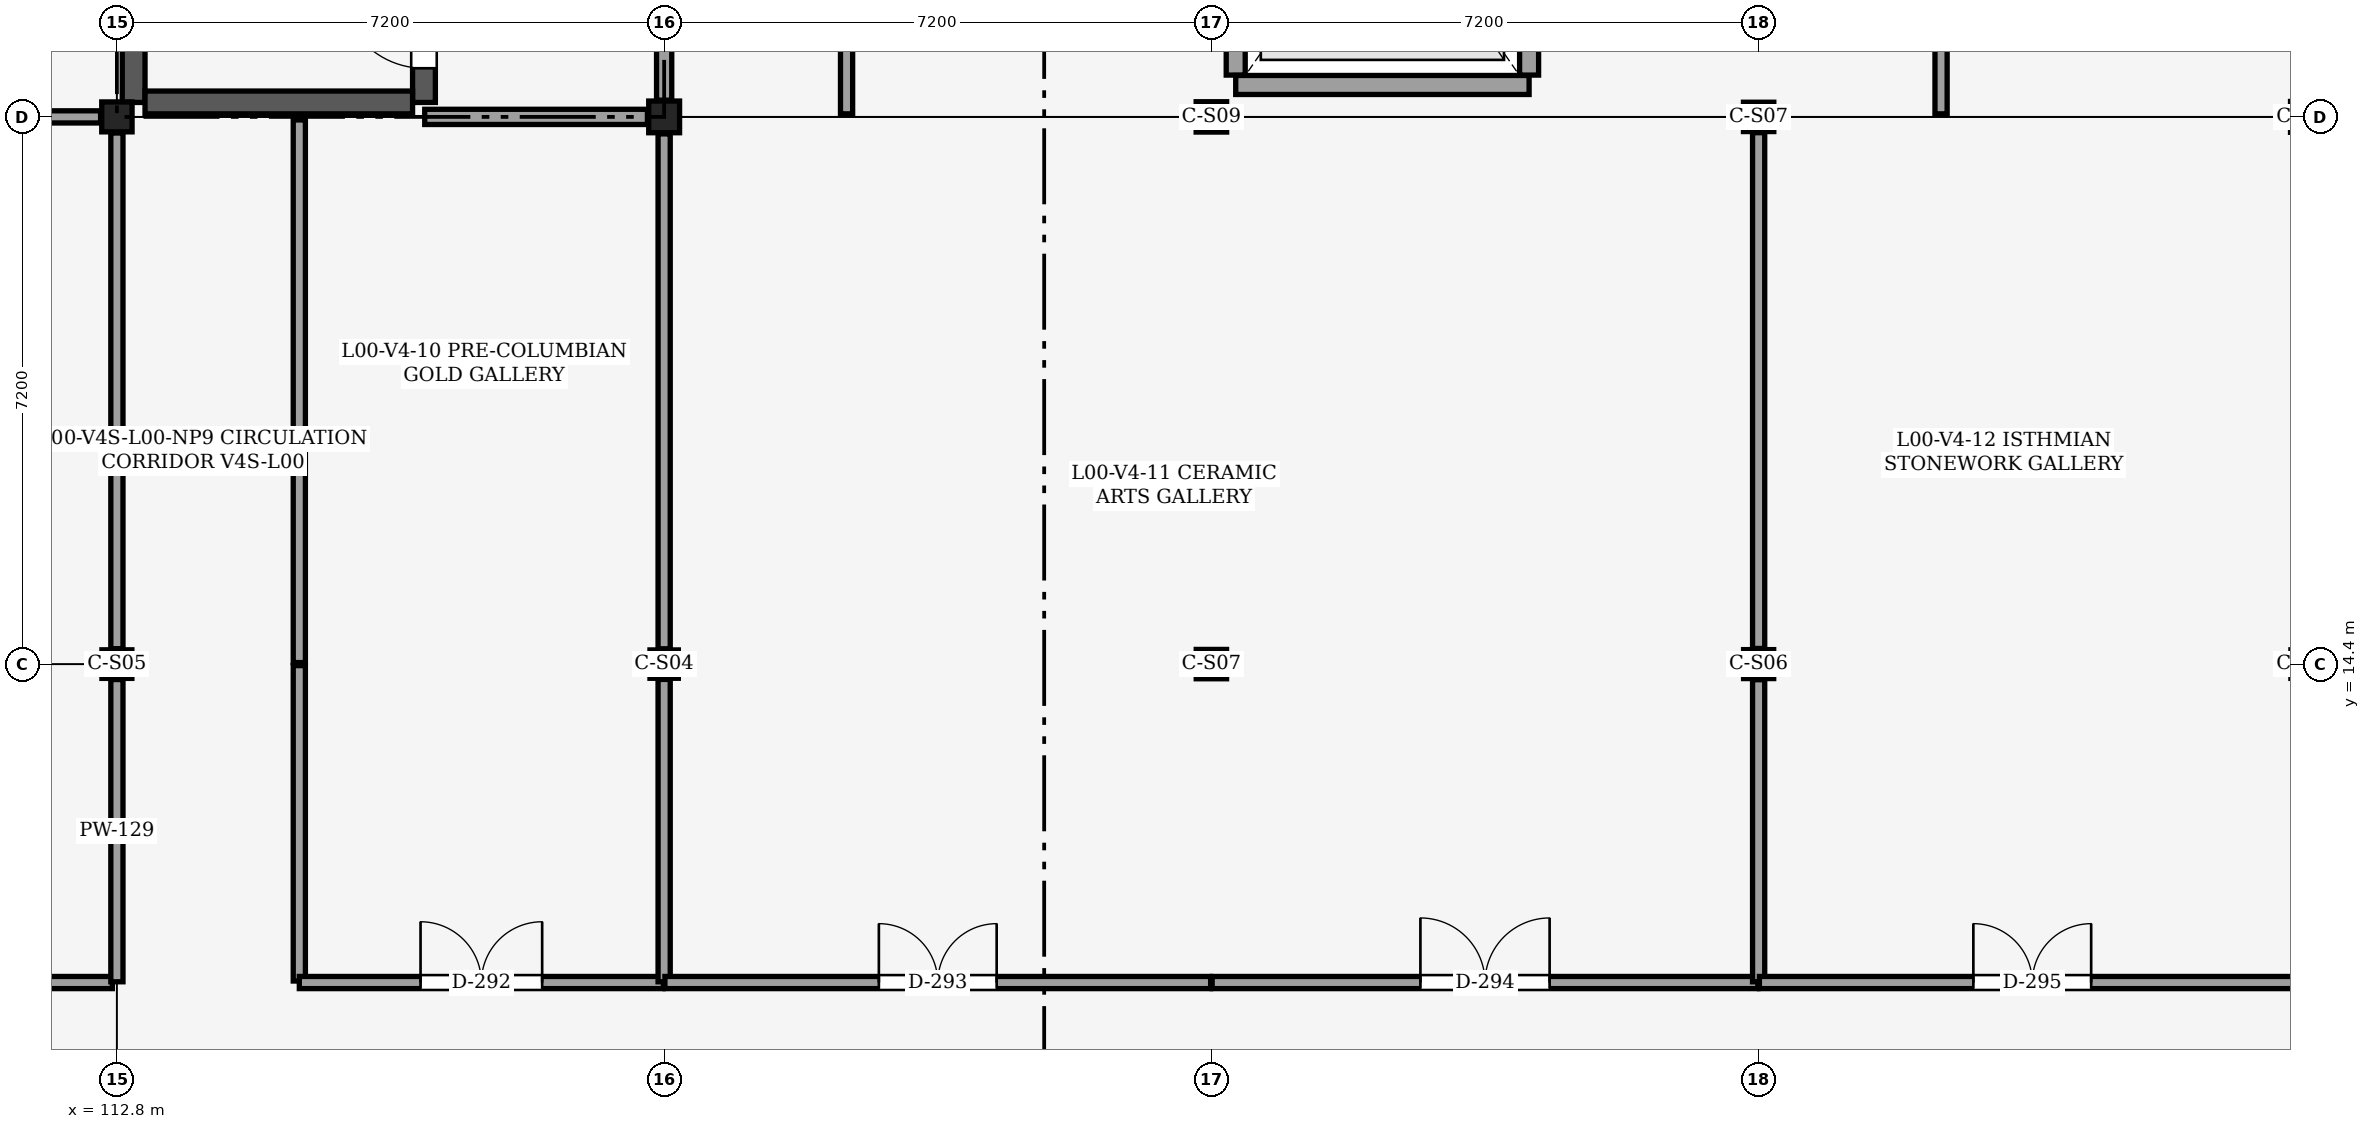
"""IFC4 building model, lengths in metres.
Left out: names, types, materials, properties, quantities, classifications, styles, units other than length and angle.
Written with IfcOpenShell. Run it as: python <this file> out.ifc"""

import sys

from ifc_helpers import new_model, si_unit, direction, frame, frame_2d, origin, origin_2d, place, context, subcontext, project, spatial, rectangle, i_section, extrude, element, fill, save


model = new_model("IFC4")
c1 = context("Model", 3, precision=1e-05, world=origin(), true_north=direction((0.0, 1.0)))
c2 = subcontext(c1, "Body", "Model", "MODEL_VIEW")
j1 = project(units=[si_unit("LENGTHUNIT", "METRE"), si_unit("PLANEANGLEUNIT", "RADIAN")], contexts=[c1])
p1 = place(None, origin())
s1 = spatial("IfcSite", under=j1, at=p1, CompositionType="ELEMENT")
p2 = place(p1, origin())
s2 = spatial("IfcBuilding", under=s1, at=p2, CompositionType="ELEMENT")
p3 = place(p2, origin())
s3 = spatial("IfcBuildingStorey", under=s2, at=p3, CompositionType="ELEMENT", Elevation=0.0)
p4 = place(p3, frame((112.8, 14.4, 0.0), z_axis=(0.0, 0.0, 1.0), x_axis=(1.0, 0.0, 0.0)))
e1 = element("IfcColumn", 1, at=p4, inside=s3, PredefinedType="COLUMN", context=c2, shape_type="SweptSolid", body=[
    extrude(i_section(OverallWidth=0.394, OverallDepth=0.376, WebThickness=0.017, FlangeThickness=0.028, FilletRadius=0.025, at=origin_2d()), origin(), (0.0, 0.0, 1.0), 5.4),
])
p5 = place(p3, frame((112.8, 21.6, 0.0), z_axis=(0.0, 0.0, 1.0), x_axis=(1.0, 0.0, 0.0)))
e2 = element("IfcColumn", 2, at=p5, inside=s3, PredefinedType="COLUMN", context=c2, shape_type="SweptSolid", body=[
    extrude(i_section(OverallWidth=0.399, OverallDepth=0.394, WebThickness=0.023, FlangeThickness=0.037, FilletRadius=0.025, at=origin_2d()), origin(), (0.0, 0.0, 1.0), 5.4),
])
p6 = place(p3, frame((120.0, 14.4, 0.0), z_axis=(0.0, 0.0, 1.0), x_axis=(1.0, 0.0, 0.0)))
e3 = element("IfcColumn", 3, at=p6, inside=s3, PredefinedType="COLUMN", context=c2, shape_type="SweptSolid", body=[
    extrude(i_section(OverallWidth=0.373, OverallDepth=0.373, WebThickness=0.016, FlangeThickness=0.026, FilletRadius=0.025, at=origin_2d()), origin(), (0.0, 0.0, 1.0), 5.4),
])
p7 = place(p3, frame((120.0, 21.6, 0.0), z_axis=(0.0, 0.0, 1.0), x_axis=(1.0, 0.0, 0.0)))
e4 = element("IfcColumn", 4, at=p7, inside=s3, PredefinedType="COLUMN", context=c2, shape_type="SweptSolid", body=[
    extrude(i_section(OverallWidth=0.406, OverallDepth=0.417, WebThickness=0.03, FlangeThickness=0.048, FilletRadius=0.025, at=origin_2d()), origin(), (0.0, 0.0, 1.0), 5.4),
])
p8 = place(p3, frame((127.2, 14.4, 0.0), z_axis=(0.0, 0.0, 1.0), x_axis=(1.0, 0.0, 0.0)))
e5 = element("IfcColumn", 5, at=p8, inside=s3, PredefinedType="COLUMN", context=c2, shape_type="SweptSolid", body=[
    extrude(i_section(OverallWidth=0.399, OverallDepth=0.386, WebThickness=0.021, FlangeThickness=0.033, FilletRadius=0.025, at=origin_2d()), origin(), (0.0, 0.0, 1.0), 5.4),
])
p9 = place(p3, frame((127.2, 21.6, 0.0), z_axis=(0.0, 0.0, 1.0), x_axis=(1.0, 0.0, 0.0)))
e6 = element("IfcColumn", 6, at=p9, inside=s3, PredefinedType="COLUMN", context=c2, shape_type="SweptSolid", body=[
    extrude(i_section(OverallWidth=0.401, OverallDepth=0.399, WebThickness=0.025, FlangeThickness=0.04, FilletRadius=0.025, at=origin_2d()), origin(), (0.0, 0.0, 1.0), 5.4),
])
p10 = place(p3, frame((134.4, 14.4, 0.0), z_axis=(0.0, 0.0, 1.0), x_axis=(1.0, 0.0, 0.0)))
e7 = element("IfcColumn", 7, at=p10, inside=s3, PredefinedType="COLUMN", context=c2, shape_type="SweptSolid", body=[
    extrude(i_section(OverallWidth=0.396, OverallDepth=0.381, WebThickness=0.019, FlangeThickness=0.03, FilletRadius=0.025, at=origin_2d()), origin(), (0.0, 0.0, 1.0), 5.4),
])
p11 = place(p3, frame((134.4, 21.6, 0.0), z_axis=(0.0, 0.0, 1.0), x_axis=(1.0, 0.0, 0.0)))
e8 = element("IfcColumn", 8, at=p11, inside=s3, PredefinedType="COLUMN", context=c2, shape_type="SweptSolid", body=[
    extrude(i_section(OverallWidth=0.399, OverallDepth=0.386, WebThickness=0.021, FlangeThickness=0.033, FilletRadius=0.025, at=origin_2d()), origin(), (0.0, 0.0, 1.0), 5.4),
])
p12 = place(p3, frame((141.6, 21.6, 0.0), z_axis=(0.0, 0.0, 1.0), x_axis=(1.0, 0.0, 0.0)))
e9 = element("IfcColumn", 9, at=p12, inside=s3, PredefinedType="COLUMN", context=c2, shape_type="SweptSolid", body=[
    extrude(i_section(OverallWidth=0.404, OverallDepth=0.406, WebThickness=0.027, FlangeThickness=0.044, FilletRadius=0.025, at=origin_2d()), origin(), (0.0, 0.0, 1.0), 5.4),
])
p13 = place(p3, frame((113.02, 21.79, 0.0), z_axis=(0.0, 0.0, 1.0), x_axis=(0.0, 1.0, 0.0)))
e10 = element("IfcWall", 10, at=p13, inside=s3, PredefinedType="SHEAR", context=c2, shape_type="SweptSolid", body=[
    extrude(rectangle(XDim=8.02, YDim=0.3, at=frame_2d((4.01, 0.0))), origin(), (0.0, 0.0, 1.0), 5.16),
])
p14 = place(p3, frame((116.84, 21.79, 0.0), z_axis=(0.0, 0.0, 1.0), x_axis=(0.0, 1.0, 0.0)))
e11 = element("IfcWall", 11, at=p14, inside=s3, PredefinedType="SHEAR", context=c2, shape_type="SweptSolid", body=[
    extrude(rectangle(XDim=8.02, YDim=0.3, at=frame_2d((4.01, 0.0))), origin(), (0.0, 0.0, 1.0), 5.16),
])
p15 = place(p14, frame((0.45, 0.0, 0.0)))
e12 = element("IfcOpeningElement", 12, at=p15, cuts=e11, PredefinedType="OPENING", context=c2, shape_type="SweptSolid", body=[
    extrude(rectangle(XDim=1.1, YDim=2.15, at=frame_2d((0.55, 1.075))), frame((0.0, 0.16, 0.0), z_axis=(0.0, -1.0, 0.0), x_axis=(1.0, 0.0, 0.0)), (0.0, 0.0, 1.0), 0.321),
])
p16 = place(p3, frame((113.17, 21.79, 0.0), z_axis=(0.0, 0.0, 1.0), x_axis=(1.0, 0.0, 0.0)))
e13 = element("IfcWall", 13, at=p16, inside=s3, PredefinedType="SHEAR", context=c2, shape_type="SweptSolid", body=[
    extrude(rectangle(XDim=3.52, YDim=0.3, at=frame_2d((1.76, 0.0))), origin(), (0.0, 0.0, 1.0), 5.16),
])
p17 = place(p3, frame((116.85, 21.6, 0.0), z_axis=(0.0, 0.0, 1.0), x_axis=(1.0, 0.0, 0.0)))
e14 = element("IfcWall", 14, at=p17, inside=s3, PredefinedType="PARTITIONING", context=c2, shape_type="SweptSolid", body=[
    extrude(rectangle(XDim=2.93, YDim=0.2, at=frame_2d((1.465, 0.0))), origin(), (0.0, 0.0, 1.0), 4.678),
])
p18 = place(p3, frame((120.0, 21.82, 0.0), z_axis=(0.0, 0.0, 1.0), x_axis=(0.0, 1.0, 0.0)))
e15 = element("IfcWall", 15, at=p18, inside=s3, PredefinedType="PARTITIONING", context=c2, shape_type="SweptSolid", body=[
    extrude(rectangle(XDim=4.46, YDim=0.2, at=frame_2d((2.23, 0.0))), origin(), (0.0, 0.0, 1.0), 4.368),
])
p19 = place(p18, frame((1.505, 0.0, 0.0)))
e16 = element("IfcOpeningElement", 16, at=p19, cuts=e15, PredefinedType="OPENING", context=c2, shape_type="SweptSolid", body=[
    extrude(rectangle(XDim=1.45, YDim=2.2, at=frame_2d((0.725, 1.1))), frame((0.0, 0.11, 0.0), z_axis=(0.0, -1.0, 0.0), x_axis=(1.0, 0.0, 0.0)), (0.0, 0.0, 1.0), 0.22),
])
p20 = place(p3, frame((127.52, 22.15, 0.0), z_axis=(0.0, 0.0, 1.0), x_axis=(0.0, 1.0, 0.0)))
e17 = element("IfcWall", 17, at=p20, inside=s3, PredefinedType="PARTITIONING", context=c2, shape_type="SweptSolid", body=[
    extrude(rectangle(XDim=5.2, YDim=0.25, at=frame_2d((2.6, 0.0))), origin(), (0.0, 0.0, 1.0), 4.284),
])
p21 = place(p3, frame((127.52, 22.02, 0.0), z_axis=(0.0, 0.0, 1.0), x_axis=(1.0, 0.0, 0.0)))
e18 = element("IfcWall", 18, at=p21, inside=s3, PredefinedType="PARTITIONING", context=c2, shape_type="SweptSolid", body=[
    extrude(rectangle(XDim=3.86, YDim=0.25, at=frame_2d((1.93, 0.0))), origin(), (0.0, 0.0, 1.0), 5.16),
])
p22 = place(p3, frame((131.38, 22.15, 0.0), z_axis=(0.0, 0.0, 1.0), x_axis=(0.0, 1.0, 0.0)))
e19 = element("IfcWall", 19, at=p22, inside=s3, PredefinedType="PARTITIONING", context=c2, shape_type="SweptSolid", body=[
    extrude(rectangle(XDim=5.2, YDim=0.25, at=frame_2d((2.6, 0.0))), origin(), (0.0, 0.0, 1.0), 5.16),
])
p23 = place(p22, frame((1.35, 0.0, 0.0)))
e20 = element("IfcOpeningElement", 20, at=p23, cuts=e19, PredefinedType="OPENING", context=c2, shape_type="SweptSolid", body=[
    extrude(rectangle(XDim=2.5, YDim=2.6, at=frame_2d((1.25, 1.3))), frame((0.0, 0.135, 0.0), z_axis=(0.0, -1.0, 0.0), x_axis=(1.0, 0.0, 0.0)), (0.0, 0.0, 1.0), 0.271),
])
p24 = place(p3, frame((104.41, 10.21, 0.0), z_axis=(0.0, 0.0, 1.0), x_axis=(1.0, 0.0, 0.0)))
e21 = element("IfcWall", 21, at=p24, inside=s3, PredefinedType="PARTITIONING", context=c2, shape_type="SweptSolid", body=[
    extrude(rectangle(XDim=8.33, YDim=0.16, at=frame_2d((4.165, 0.0))), origin(), (0.0, 0.0, 1.0), 5.14),
])
p25 = place(p24, frame((3.215, 0.0, 0.0)))
e22 = element("IfcOpeningElement", 22, at=p25, cuts=e21, PredefinedType="OPENING", context=c2, shape_type="SweptSolid", body=[
    extrude(rectangle(XDim=1.9, YDim=2.45, at=frame_2d((0.95, 1.225))), frame((0.0, 0.09, 0.0), z_axis=(0.0, -1.0, 0.0), x_axis=(1.0, 0.0, 0.0)), (0.0, 0.0, 1.0), 0.18),
])
p26 = place(p3, frame((112.8, 10.22, 0.0), z_axis=(0.0, 0.0, 1.0), x_axis=(0.0, 1.0, 0.0)))
e23 = element("IfcWall", 23, at=p26, inside=s3, PredefinedType="PARTITIONING", context=c2, shape_type="SweptSolid", body=[
    extrude(rectangle(XDim=3.977, YDim=0.16, at=frame_2d((1.989, 0.0))), origin(), (0.0, 0.0, 1.0), 4.533),
])
p27 = place(p3, frame((104.517, 21.6, 0.0), z_axis=(0.0, 0.0, 1.0), x_axis=(1.0, 0.0, 0.0)))
e24 = element("IfcWall", 24, at=p27, inside=s3, PredefinedType="PARTITIONING", context=c2, shape_type="SweptSolid", body=[
    extrude(rectangle(XDim=8.069, YDim=0.16, at=frame_2d((4.034, 0.0))), origin(), (0.0, 0.0, 1.0), 4.528),
])
p28 = place(p27, frame((3.234, 0.0, 0.0)))
e25 = element("IfcOpeningElement", 25, at=p28, cuts=e24, PredefinedType="OPENING", context=c2, shape_type="SweptSolid", body=[
    extrude(rectangle(XDim=1.6, YDim=2.35, at=frame_2d((0.8, 1.175))), frame((0.0, 0.09, 0.0), z_axis=(0.0, -1.0, 0.0), x_axis=(1.0, 0.0, 0.0)), (0.0, 0.0, 1.0), 0.18),
])
p29 = place(p3, frame((112.8, 14.603, 0.0), z_axis=(0.0, 0.0, 1.0), x_axis=(0.0, 1.0, 0.0)))
e26 = element("IfcWall", 26, at=p29, inside=s3, PredefinedType="PARTITIONING", context=c2, shape_type="SweptSolid", body=[
    extrude(rectangle(XDim=6.785, YDim=0.16, at=frame_2d((3.393, 0.0))), origin(), (0.0, 0.0, 1.0), 4.607),
])
p30 = place(p3, frame((115.2, 10.23, 0.0), z_axis=(0.0, 0.0, 1.0), x_axis=(0.0, 1.0, 0.0)))
e27 = element("IfcWall", 27, at=p30, inside=s3, PredefinedType="PARTITIONING", context=c2, shape_type="SweptSolid", body=[
    extrude(rectangle(XDim=4.15, YDim=0.16, at=frame_2d((2.075, 0.0))), origin(), (0.0, 0.0, 1.0), 5.14),
])
p31 = place(p3, frame((115.2, 14.42, 0.0), z_axis=(0.0, 0.0, 1.0), x_axis=(0.0, 1.0, 0.0)))
e28 = element("IfcWall", 28, at=p31, inside=s3, PredefinedType="PARTITIONING", context=c2, shape_type="SweptSolid", body=[
    extrude(rectangle(XDim=7.14, YDim=0.16, at=frame_2d((3.57, 0.0))), origin(), (0.0, 0.0, 1.0), 5.14),
])
p32 = place(p3, frame((115.2, 10.21, 0.0), z_axis=(0.0, 0.0, 1.0), x_axis=(1.0, 0.0, 0.0)))
e29 = element("IfcWall", 29, at=p32, inside=s3, PredefinedType="PARTITIONING", context=c2, shape_type="SweptSolid", body=[
    extrude(rectangle(XDim=4.79, YDim=0.16, at=frame_2d((2.395, 0.0))), origin(), (0.0, 0.0, 1.0), 5.14),
])
p33 = place(p32, frame((1.595, 0.0, 0.0)))
e30 = element("IfcOpeningElement", 30, at=p33, cuts=e29, PredefinedType="OPENING", context=c2, shape_type="SweptSolid", body=[
    extrude(rectangle(XDim=1.6, YDim=2.35, at=frame_2d((0.8, 1.175))), frame((0.0, 0.09, 0.0), z_axis=(0.0, -1.0, 0.0), x_axis=(1.0, 0.0, 0.0)), (0.0, 0.0, 1.0), 0.18),
])
p34 = place(p3, frame((120.0, 10.22, 0.0), z_axis=(0.0, 0.0, 1.0), x_axis=(0.0, 1.0, 0.0)))
e31 = element("IfcWall", 31, at=p34, inside=s3, PredefinedType="PARTITIONING", context=c2, shape_type="SweptSolid", body=[
    extrude(rectangle(XDim=3.979, YDim=0.16, at=frame_2d((1.989, 0.0))), origin(), (0.0, 0.0, 1.0), 4.607),
])
p35 = place(p3, frame((120.0, 14.602, 0.0), z_axis=(0.0, 0.0, 1.0), x_axis=(0.0, 1.0, 0.0)))
e32 = element("IfcWall", 32, at=p35, inside=s3, PredefinedType="PARTITIONING", context=c2, shape_type="SweptSolid", body=[
    extrude(rectangle(XDim=6.775, YDim=0.16, at=frame_2d((3.387, 0.0))), origin(), (0.0, 0.0, 1.0), 4.678),
])
p36 = place(p3, frame((120.01, 10.21, 0.0), z_axis=(0.0, 0.0, 1.0), x_axis=(1.0, 0.0, 0.0)))
e33 = element("IfcWall", 33, at=p36, inside=s3, PredefinedType="PARTITIONING", context=c2, shape_type="SweptSolid", body=[
    extrude(rectangle(XDim=7.18, YDim=0.16, at=frame_2d((3.59, 0.0))), origin(), (0.0, 0.0, 1.0), 5.14),
])
p37 = place(p36, frame((2.815, 0.0, 0.0)))
e34 = element("IfcOpeningElement", 34, at=p37, cuts=e33, PredefinedType="OPENING", context=c2, shape_type="SweptSolid", body=[
    extrude(rectangle(XDim=1.55, YDim=2.3, at=frame_2d((0.775, 1.15))), frame((0.0, 0.09, 0.0), z_axis=(0.0, -1.0, 0.0), x_axis=(1.0, 0.0, 0.0)), (0.0, 0.0, 1.0), 0.18),
])
p38 = place(p3, frame((127.21, 10.21, 0.0), z_axis=(0.0, 0.0, 1.0), x_axis=(1.0, 0.0, 0.0)))
e35 = element("IfcWall", 35, at=p38, inside=s3, PredefinedType="PARTITIONING", context=c2, shape_type="SweptSolid", body=[
    extrude(rectangle(XDim=7.18, YDim=0.16, at=frame_2d((3.59, 0.0))), origin(), (0.0, 0.0, 1.0), 5.14),
])
p39 = place(p38, frame((2.74, 0.0, 0.0)))
e36 = element("IfcOpeningElement", 36, at=p39, cuts=e35, PredefinedType="OPENING", context=c2, shape_type="SweptSolid", body=[
    extrude(rectangle(XDim=1.7, YDim=2.4, at=frame_2d((0.85, 1.2))), frame((0.0, 0.09, 0.0), z_axis=(0.0, -1.0, 0.0), x_axis=(1.0, 0.0, 0.0)), (0.0, 0.0, 1.0), 0.18),
])
p40 = place(p3, frame((134.4, 10.22, 0.0), z_axis=(0.0, 0.0, 1.0), x_axis=(0.0, 1.0, 0.0)))
e37 = element("IfcWall", 37, at=p40, inside=s3, PredefinedType="PARTITIONING", context=c2, shape_type="SweptSolid", body=[
    extrude(rectangle(XDim=3.975, YDim=0.16, at=frame_2d((1.987, 0.0))), origin(), (0.0, 0.0, 1.0), 4.528),
])
p41 = place(p3, frame((134.4, 14.605, 0.0), z_axis=(0.0, 0.0, 1.0), x_axis=(0.0, 1.0, 0.0)))
e38 = element("IfcWall", 38, at=p41, inside=s3, PredefinedType="PARTITIONING", context=c2, shape_type="SweptSolid", body=[
    extrude(rectangle(XDim=6.787, YDim=0.16, at=frame_2d((3.393, 0.0))), origin(), (0.0, 0.0, 1.0), 4.533),
])
p42 = place(p3, frame((134.41, 10.21, 0.0), z_axis=(0.0, 0.0, 1.0), x_axis=(1.0, 0.0, 0.0)))
e39 = element("IfcWall", 39, at=p42, inside=s3, PredefinedType="PARTITIONING", context=c2, shape_type="SweptSolid", body=[
    extrude(rectangle(XDim=7.18, YDim=0.16, at=frame_2d((3.59, 0.0))), origin(), (0.0, 0.0, 1.0), 5.14),
])
p43 = place(p42, frame((2.815, 0.0, 0.0)))
e40 = element("IfcOpeningElement", 40, at=p43, cuts=e39, PredefinedType="OPENING", context=c2, shape_type="SweptSolid", body=[
    extrude(rectangle(XDim=1.55, YDim=2.3, at=frame_2d((0.775, 1.15))), frame((0.0, 0.09, 0.0), z_axis=(0.0, -1.0, 0.0), x_axis=(1.0, 0.0, 0.0)), (0.0, 0.0, 1.0), 0.18),
])
for number, where, z_axis, x_axis in (
    (41, (122.4, 21.64, 0.0), (0.0, 0.0, 1.0), (0.0, 1.0, 0.0)),
    (42, (136.8, 21.64, 0.0), (0.0, 0.0, 1.0), (0.0, 1.0, 0.0)),
):
    element("IfcWall", number, at=place(p3, frame(where, z_axis=z_axis, x_axis=x_axis)), inside=s3, PredefinedType="PARTITIONING", context=c2, shape_type="SweptSolid", body=[
        extrude(rectangle(XDim=8.34, YDim=0.16, at=frame_2d((4.17, 0.0))), origin(), (0.0, 0.0, 1.0), 5.14),
    ])
p44 = place(p15, origin())
e43 = element("IfcDoor", 43, at=p44, inside=s3, OperationType="SINGLE_SWING_RIGHT", PredefinedType="DOOR", context=c2, shape_type="SweptSolid", body=[
    extrude(rectangle(XDim=1.1, YDim=2.15, at=frame_2d((0.55, 1.075))), frame((0.0, 0.025, 0.0), z_axis=(0.0, -1.0, 0.0), x_axis=(1.0, 0.0, 0.0)), (0.0, 0.0, 1.0), 0.05),
])
fill(e12, e43)
p45 = place(p33, origin())
e44 = element("IfcDoor", 44, at=p45, inside=s3, OperationType="DOUBLE_DOOR_SINGLE_SWING", PredefinedType="DOOR", context=c2, shape_type="SweptSolid", body=[
    extrude(rectangle(XDim=1.6, YDim=2.35, at=frame_2d((0.8, 1.175))), frame((0.0, 0.025, 0.0), z_axis=(0.0, -1.0, 0.0), x_axis=(1.0, 0.0, 0.0)), (0.0, 0.0, 1.0), 0.05),
])
fill(e30, e44)
p46 = place(p37, origin())
e45 = element("IfcDoor", 45, at=p46, inside=s3, OperationType="DOUBLE_DOOR_SINGLE_SWING", PredefinedType="DOOR", context=c2, shape_type="SweptSolid", body=[
    extrude(rectangle(XDim=1.55, YDim=2.3, at=frame_2d((0.775, 1.15))), frame((0.0, 0.025, 0.0), z_axis=(0.0, -1.0, 0.0), x_axis=(1.0, 0.0, 0.0)), (0.0, 0.0, 1.0), 0.05),
])
fill(e34, e45)
p47 = place(p39, origin())
e46 = element("IfcDoor", 46, at=p47, inside=s3, OperationType="DOUBLE_DOOR_SINGLE_SWING", PredefinedType="DOOR", context=c2, shape_type="SweptSolid", body=[
    extrude(rectangle(XDim=1.7, YDim=2.4, at=frame_2d((0.85, 1.2))), frame((0.0, 0.025, 0.0), z_axis=(0.0, -1.0, 0.0), x_axis=(1.0, 0.0, 0.0)), (0.0, 0.0, 1.0), 0.05),
])
fill(e36, e46)
p48 = place(p43, origin())
e47 = element("IfcDoor", 47, at=p48, inside=s3, OperationType="DOUBLE_DOOR_SINGLE_SWING", PredefinedType="DOOR", context=c2, shape_type="SweptSolid", body=[
    extrude(rectangle(XDim=1.55, YDim=2.3, at=frame_2d((0.775, 1.15))), frame((0.0, 0.025, 0.0), z_axis=(0.0, -1.0, 0.0), x_axis=(1.0, 0.0, 0.0)), (0.0, 0.0, 1.0), 0.05),
])
fill(e40, e47)
save(model, sys.argv[1])
